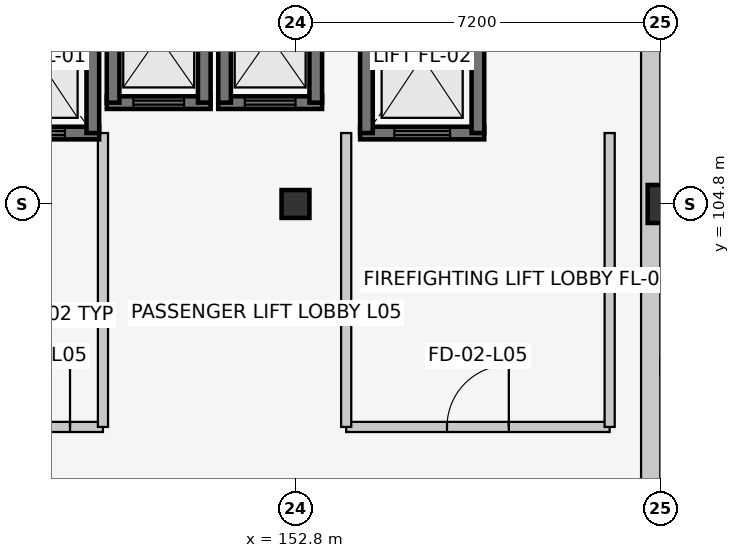
"""IFC4 building model, lengths in metres.
Left out: names, types, materials, properties, quantities, classifications, styles, units other than length and angle.
Written with IfcOpenShell. Run it as: python <this file> out.ifc"""

import sys

from ifc_helpers import new_model, si_unit, direction, frame, frame_2d, origin, origin_2d, place, context, subcontext, project, spatial, rectangle, extrude, element, fill, save


model = new_model("IFC4")
c1 = context("Model", 3, precision=1e-05, world=origin(), true_north=direction((0.0, 1.0)))
c2 = subcontext(c1, "Body", "Model", "MODEL_VIEW")
j1 = project(units=[si_unit("LENGTHUNIT", "METRE"), si_unit("PLANEANGLEUNIT", "RADIAN")], contexts=[c1])
p1 = place(None, origin())
s1 = spatial("IfcSite", under=j1, at=p1, CompositionType="ELEMENT")
p2 = place(p1, origin())
s2 = spatial("IfcBuilding", under=s1, at=p2, CompositionType="ELEMENT")
p3 = place(p2, frame((0.0, 0.0, 21.9)))
s3 = spatial("IfcBuildingStorey", under=s2, at=p3, CompositionType="ELEMENT", Elevation=21.9)
p4 = place(p3, frame((152.8, 104.8, 0.0), z_axis=(0.0, 0.0, 1.0), x_axis=(1.0, 0.0, 0.0)))
e1 = element("IfcColumn", 1, at=p4, inside=s3, PredefinedType="COLUMN", context=c2, shape_type="SweptSolid", body=[
    extrude(rectangle(XDim=0.55, YDim=0.55, at=origin_2d()), origin(), (0.0, 0.0, 1.0), 3.9),
])
p5 = place(p3, frame((160.0, 104.8, 0.0), z_axis=(0.0, 0.0, 1.0), x_axis=(1.0, 0.0, 0.0)))
e2 = element("IfcColumn", 2, at=p5, inside=s3, PredefinedType="COLUMN", context=c2, shape_type="SweptSolid", body=[
    extrude(rectangle(XDim=0.5, YDim=0.75, at=origin_2d()), origin(), (0.0, 0.0, 1.0), 3.9),
])
p6 = place(p3, frame((159.81, 112.0, 0.0), z_axis=(0.0, 0.0, 1.0), x_axis=(0.0, -1.0, 0.0)))
e3 = element("IfcWall", 3, at=p6, inside=s3, PredefinedType="SOLIDWALL", context=c2, shape_type="SweptSolid", body=[
    extrude(rectangle(XDim=28.8, YDim=0.38, at=frame_2d((14.4, 0.0))), origin(), (0.0, 0.0, 1.0), 2.915),
])
p7 = place(p3, frame((146.475, 106.2, 0.0), z_axis=(0.0, 0.0, 1.0), x_axis=(1.0, 0.0, 0.0)))
e4 = element("IfcWall", 4, at=p7, inside=s3, PredefinedType="SHEAR", context=c2, shape_type="SweptSolid", body=[
    extrude(rectangle(XDim=2.45, YDim=0.25, at=frame_2d((1.225, 0.0))), origin(), (0.0, 0.0, 1.0), 3.66),
])
p8 = place(p7, frame((0.675, 0.0, 0.0)))
e5 = element("IfcOpeningElement", 5, at=p8, cuts=e4, PredefinedType="OPENING", context=c2, shape_type="SweptSolid", body=[
    extrude(rectangle(XDim=1.1, YDim=2.15, at=frame_2d((0.55, 1.075))), frame((0.0, 0.137, 0.0), z_axis=(0.0, -1.0, 0.0), x_axis=(1.0, 0.0, 0.0)), (0.0, 0.0, 1.0), 0.274),
])
p9 = place(p3, frame((148.8, 106.2, 0.0), z_axis=(0.0, 0.0, 1.0), x_axis=(0.0, 1.0, 0.0)))
e6 = element("IfcWall", 6, at=p9, inside=s3, PredefinedType="SHEAR", context=c2, shape_type="SweptSolid", body=[
    extrude(rectangle(XDim=3.0, YDim=0.25, at=frame_2d((1.5, 0.0))), origin(), (0.0, 0.0, 1.0), 3.66),
])
p10 = place(p3, frame((146.4, 100.4, 0.0), z_axis=(0.0, 0.0, 1.0), x_axis=(1.0, 0.0, 0.0)))
e7 = element("IfcWall", 7, at=p10, inside=s3, PredefinedType="PARTITIONING", context=c2, shape_type="SweptSolid", body=[
    extrude(rectangle(XDim=2.6, YDim=0.2, at=frame_2d((1.3, 0.0))), origin(), (0.0, 0.0, 1.0), 3.66),
])
p11 = place(p10, frame((0.65, 0.0, 0.0)))
e8 = element("IfcOpeningElement", 8, at=p11, cuts=e7, PredefinedType="OPENING", context=c2, shape_type="SweptSolid", body=[
    extrude(rectangle(XDim=1.3, YDim=2.2, at=frame_2d((0.65, 1.1))), frame((0.0, 0.112, 0.0), z_axis=(0.0, -1.0, 0.0), x_axis=(1.0, 0.0, 0.0)), (0.0, 0.0, 1.0), 0.224),
])
p12 = place(p3, frame((149.0, 100.4, 0.0), z_axis=(0.0, 0.0, 1.0), x_axis=(0.0, 1.0, 0.0)))
e9 = element("IfcWall", 9, at=p12, inside=s3, PredefinedType="PARTITIONING", context=c2, shape_type="SweptSolid", body=[
    extrude(rectangle(XDim=5.8, YDim=0.2, at=frame_2d((2.9, 0.0))), origin(), (0.0, 0.0, 1.0), 3.335),
])
p13 = place(p3, frame((154.075, 106.2, 0.0), z_axis=(0.0, 0.0, 1.0), x_axis=(1.0, 0.0, 0.0)))
e10 = element("IfcWall", 10, at=p13, inside=s3, PredefinedType="SHEAR", context=c2, shape_type="SweptSolid", body=[
    extrude(rectangle(XDim=2.45, YDim=0.25, at=frame_2d((1.225, 0.0))), origin(), (0.0, 0.0, 1.0), 3.66),
])
p14 = place(p13, frame((0.675, 0.0, 0.0)))
e11 = element("IfcOpeningElement", 11, at=p14, cuts=e10, PredefinedType="OPENING", context=c2, shape_type="SweptSolid", body=[
    extrude(rectangle(XDim=1.1, YDim=2.15, at=frame_2d((0.55, 1.075))), frame((0.0, 0.137, 0.0), z_axis=(0.0, -1.0, 0.0), x_axis=(1.0, 0.0, 0.0)), (0.0, 0.0, 1.0), 0.274),
])
for number, where, z_axis, x_axis in (
    (12, (154.2, 109.2, 0.0), (0.0, 0.0, 1.0), (0.0, -1.0, 0.0)),
    (13, (156.4, 106.2, 0.0), (0.0, 0.0, 1.0), (0.0, 1.0, 0.0)),
):
    element("IfcWall", number, at=place(p3, frame(where, z_axis=z_axis, x_axis=x_axis)), inside=s3, PredefinedType="SHEAR", context=c2, shape_type="SweptSolid", body=[
        extrude(rectangle(XDim=3.0, YDim=0.25, at=frame_2d((1.5, 0.0))), origin(), (0.0, 0.0, 1.0), 3.66),
    ])
p15 = place(p3, frame((153.8, 100.4, 0.0), z_axis=(0.0, 0.0, 1.0), x_axis=(1.0, 0.0, 0.0)))
e14 = element("IfcWall", 14, at=p15, inside=s3, PredefinedType="PARTITIONING", context=c2, shape_type="SweptSolid", body=[
    extrude(rectangle(XDim=5.2, YDim=0.2, at=frame_2d((2.6, 0.0))), origin(), (0.0, 0.0, 1.0), 3.66),
])
p16 = place(p15, frame((1.99, 0.0, 0.0)))
e15 = element("IfcOpeningElement", 15, at=p16, cuts=e14, PredefinedType="OPENING", context=c2, shape_type="SweptSolid", body=[
    extrude(rectangle(XDim=1.22, YDim=2.2, at=frame_2d((0.61, 1.1))), frame((0.0, 0.112, 0.0), z_axis=(0.0, -1.0, 0.0), x_axis=(1.0, 0.0, 0.0)), (0.0, 0.0, 1.0), 0.224),
])
for number, where, z_axis, x_axis in (
    (16, (153.8, 106.2, 0.0), (0.0, 0.0, 1.0), (0.0, -1.0, 0.0)),
    (17, (159.0, 100.4, 0.0), (0.0, 0.0, 1.0), (0.0, 1.0, 0.0)),
):
    element("IfcWall", number, at=place(p3, frame(where, z_axis=z_axis, x_axis=x_axis)), inside=s3, PredefinedType="PARTITIONING", context=c2, shape_type="SweptSolid", body=[
        extrude(rectangle(XDim=5.8, YDim=0.2, at=frame_2d((2.9, 0.0))), origin(), (0.0, 0.0, 1.0), 3.66),
    ])
p17 = place(p3, frame((149.075, 106.8, 0.0), z_axis=(0.0, 0.0, 1.0), x_axis=(1.0, 0.0, 0.0)))
e18 = element("IfcWall", 18, at=p17, inside=s3, PredefinedType="SHEAR", context=c2, shape_type="SweptSolid", body=[
    extrude(rectangle(XDim=2.05, YDim=0.25, at=frame_2d((1.025, 0.0))), origin(), (0.0, 0.0, 1.0), 3.66),
])
p18 = place(p17, frame((0.525, 0.0, 0.0)))
e19 = element("IfcOpeningElement", 19, at=p18, cuts=e18, PredefinedType="OPENING", context=c2, shape_type="SweptSolid", body=[
    extrude(rectangle(XDim=1.0, YDim=2.15, at=frame_2d((0.5, 1.075))), frame((0.0, 0.137, 0.0), z_axis=(0.0, -1.0, 0.0), x_axis=(1.0, 0.0, 0.0)), (0.0, 0.0, 1.0), 0.274),
])
for number, where, z_axis, x_axis in (
    (20, (149.2, 109.4, 0.0), (0.0, 0.0, 1.0), (0.0, -1.0, 0.0)),
    (21, (151.0, 106.8, 0.0), (0.0, 0.0, 1.0), (0.0, 1.0, 0.0)),
):
    element("IfcWall", number, at=place(p3, frame(where, z_axis=z_axis, x_axis=x_axis)), inside=s3, PredefinedType="SHEAR", context=c2, shape_type="SweptSolid", body=[
        extrude(rectangle(XDim=2.6, YDim=0.25, at=frame_2d((1.3, 0.0))), origin(), (0.0, 0.0, 1.0), 3.66),
    ])
p19 = place(p3, frame((151.275, 106.8, 0.0), z_axis=(0.0, 0.0, 1.0), x_axis=(1.0, 0.0, 0.0)))
e22 = element("IfcWall", 22, at=p19, inside=s3, PredefinedType="SHEAR", context=c2, shape_type="SweptSolid", body=[
    extrude(rectangle(XDim=2.05, YDim=0.25, at=frame_2d((1.025, 0.0))), origin(), (0.0, 0.0, 1.0), 3.66),
])
p20 = place(p19, frame((0.525, 0.0, 0.0)))
e23 = element("IfcOpeningElement", 23, at=p20, cuts=e22, PredefinedType="OPENING", context=c2, shape_type="SweptSolid", body=[
    extrude(rectangle(XDim=1.0, YDim=2.15, at=frame_2d((0.5, 1.075))), frame((0.0, 0.137, 0.0), z_axis=(0.0, -1.0, 0.0), x_axis=(1.0, 0.0, 0.0)), (0.0, 0.0, 1.0), 0.274),
])
for number, where, z_axis, x_axis in (
    (24, (151.4, 109.4, 0.0), (0.0, 0.0, 1.0), (0.0, -1.0, 0.0)),
    (25, (153.2, 106.8, 0.0), (0.0, 0.0, 1.0), (0.0, 1.0, 0.0)),
):
    element("IfcWall", number, at=place(p3, frame(where, z_axis=z_axis, x_axis=x_axis)), inside=s3, PredefinedType="SHEAR", context=c2, shape_type="SweptSolid", body=[
        extrude(rectangle(XDim=2.6, YDim=0.25, at=frame_2d((1.3, 0.0))), origin(), (0.0, 0.0, 1.0), 3.66),
    ])
p21 = place(p8, origin())
e26 = element("IfcDoor", 26, at=p21, inside=s3, OperationType="SLIDING_TO_LEFT", PredefinedType="DOOR", context=c2, shape_type="SweptSolid", body=[
    extrude(rectangle(XDim=1.1, YDim=2.15, at=frame_2d((0.55, 1.075))), frame((0.0, 0.025, 0.0), z_axis=(0.0, -1.0, 0.0), x_axis=(1.0, 0.0, 0.0)), (0.0, 0.0, 1.0), 0.05),
])
fill(e5, e26)
p22 = place(p11, origin())
e27 = element("IfcDoor", 27, at=p22, inside=s3, OperationType="SINGLE_SWING_RIGHT", PredefinedType="DOOR", context=c2, shape_type="SweptSolid", body=[
    extrude(rectangle(XDim=1.3, YDim=2.2, at=frame_2d((0.65, 1.1))), frame((0.0, 0.025, 0.0), z_axis=(0.0, -1.0, 0.0), x_axis=(1.0, 0.0, 0.0)), (0.0, 0.0, 1.0), 0.05),
])
fill(e8, e27)
p23 = place(p14, origin())
e28 = element("IfcDoor", 28, at=p23, inside=s3, OperationType="SLIDING_TO_LEFT", PredefinedType="DOOR", context=c2, shape_type="SweptSolid", body=[
    extrude(rectangle(XDim=1.1, YDim=2.15, at=frame_2d((0.55, 1.075))), frame((0.0, 0.025, 0.0), z_axis=(0.0, -1.0, 0.0), x_axis=(1.0, 0.0, 0.0)), (0.0, 0.0, 1.0), 0.05),
])
fill(e11, e28)
p24 = place(p16, origin())
e29 = element("IfcDoor", 29, at=p24, inside=s3, OperationType="SINGLE_SWING_RIGHT", PredefinedType="DOOR", context=c2, shape_type="SweptSolid", body=[
    extrude(rectangle(XDim=1.22, YDim=2.2, at=frame_2d((0.61, 1.1))), frame((0.0, 0.025, 0.0), z_axis=(0.0, -1.0, 0.0), x_axis=(1.0, 0.0, 0.0)), (0.0, 0.0, 1.0), 0.05),
])
fill(e15, e29)
p25 = place(p18, origin())
e30 = element("IfcDoor", 30, at=p25, inside=s3, OperationType="SLIDING_TO_LEFT", PredefinedType="DOOR", context=c2, shape_type="SweptSolid", body=[
    extrude(rectangle(XDim=1.0, YDim=2.15, at=frame_2d((0.5, 1.075))), frame((0.0, 0.025, 0.0), z_axis=(0.0, -1.0, 0.0), x_axis=(1.0, 0.0, 0.0)), (0.0, 0.0, 1.0), 0.05),
])
fill(e19, e30)
p26 = place(p20, origin())
e31 = element("IfcDoor", 31, at=p26, inside=s3, OperationType="SLIDING_TO_LEFT", PredefinedType="DOOR", context=c2, shape_type="SweptSolid", body=[
    extrude(rectangle(XDim=1.0, YDim=2.15, at=frame_2d((0.5, 1.075))), frame((0.0, 0.025, 0.0), z_axis=(0.0, -1.0, 0.0), x_axis=(1.0, 0.0, 0.0)), (0.0, 0.0, 1.0), 0.05),
])
fill(e23, e31)
save(model, sys.argv[1])
